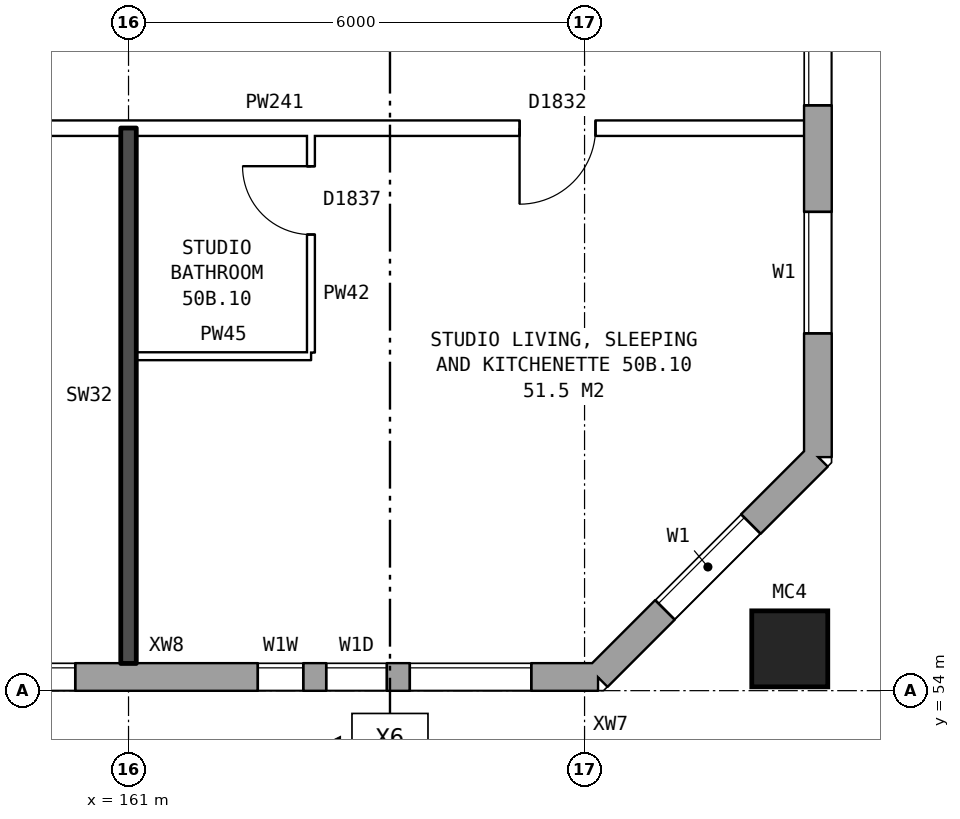
"""IFC4 building model, lengths in metres.
Left out: names, types, materials, properties, quantities, classifications, styles, units other than length and angle.
Written with IfcOpenShell. Run it as: python <this file> out.ifc"""

import sys

from ifc_helpers import new_model, si_unit, direction, frame, frame_2d, origin, origin_2d, place, context, subcontext, project, spatial, rectangle, hollow_rectangle, extrude, element, fill, save


model = new_model("IFC4")
c1 = context("Model", 3, precision=1e-05, world=origin(), true_north=direction((0.0, 1.0)))
c2 = subcontext(c1, "Body", "Model", "MODEL_VIEW")
j1 = project(units=[si_unit("LENGTHUNIT", "METRE"), si_unit("PLANEANGLEUNIT", "RADIAN")], contexts=[c1])
p1 = place(None, origin())
s1 = spatial("IfcSite", under=j1, at=p1, CompositionType="ELEMENT")
p2 = place(p1, origin())
s2 = spatial("IfcBuilding", under=s1, at=p2, CompositionType="ELEMENT")
p3 = place(p2, frame((0.0, 0.0, 178.9)))
s3 = spatial("IfcBuildingStorey", under=s2, at=p3, CompositionType="ELEMENT", Elevation=178.9)
p4 = place(p3, frame((169.7, 54.55, 0.0), z_axis=(0.0, 0.0, 1.0), x_axis=(1.0, 0.0, 0.0)))
e1 = element("IfcColumn", 1, at=p4, inside=s3, PredefinedType="COLUMN", context=c2, shape_type="SweptSolid", body=[
    extrude(hollow_rectangle(XDim=1.0, YDim=1.0, WallThickness=0.055, at=origin_2d()), origin(), (0.0, 0.0, 1.0), 3.1),
])
p5 = place(p3, frame((134.075, 54.18, 0.0), z_axis=(0.0, 0.0, 1.0), x_axis=(1.0, 0.0, 0.0)))
e2 = element("IfcWall", 2, at=p5, inside=s3, PredefinedType="STANDARD", context=c2, shape_type="SweptSolid", body=[
    extrude(rectangle(XDim=33.101, YDim=0.36, at=frame_2d((16.55, 0.0))), origin(), (0.0, 0.0, 1.0), 2.85),
])
p6 = place(p5, frame((0.625, 0.0, 0.8)))
e3 = element("IfcOpeningElement", 3, at=p6, cuts=e2, PredefinedType="OPENING", context=c2, shape_type="SweptSolid", body=[
    extrude(rectangle(XDim=1.6, YDim=1.8, at=frame_2d((0.8, 0.9))), frame((0.0, 0.19, 0.0), z_axis=(0.0, -1.0, 0.0), x_axis=(1.0, 0.0, 0.0)), (0.0, 0.0, 1.0), 0.38),
])
p7 = place(p5, frame((3.125, 0.0, 1.1)))
e4 = element("IfcOpeningElement", 4, at=p7, cuts=e2, PredefinedType="OPENING", context=c2, shape_type="SweptSolid", body=[
    extrude(rectangle(XDim=0.8, YDim=1.5, at=frame_2d((0.4, 0.75))), frame((0.0, 0.19, 0.0), z_axis=(0.0, -1.0, 0.0), x_axis=(1.0, 0.0, 0.0)), (0.0, 0.0, 1.0), 0.38),
])
p8 = place(p5, frame((6.625, 0.0, 0.8)))
e5 = element("IfcOpeningElement", 5, at=p8, cuts=e2, PredefinedType="OPENING", context=c2, shape_type="SweptSolid", body=[
    extrude(rectangle(XDim=1.6, YDim=1.8, at=frame_2d((0.8, 0.9))), frame((0.0, 0.19, 0.0), z_axis=(0.0, -1.0, 0.0), x_axis=(1.0, 0.0, 0.0)), (0.0, 0.0, 1.0), 0.38),
])
p9 = place(p5, frame((9.625, 0.0, 0.8)))
e6 = element("IfcOpeningElement", 6, at=p9, cuts=e2, PredefinedType="OPENING", context=c2, shape_type="SweptSolid", body=[
    extrude(rectangle(XDim=1.6, YDim=1.8, at=frame_2d((0.8, 0.9))), frame((0.0, 0.19, 0.0), z_axis=(0.0, -1.0, 0.0), x_axis=(1.0, 0.0, 0.0)), (0.0, 0.0, 1.0), 0.38),
])
p10 = place(p5, frame((12.625, 0.0, 0.8)))
e7 = element("IfcOpeningElement", 7, at=p10, cuts=e2, PredefinedType="OPENING", context=c2, shape_type="SweptSolid", body=[
    extrude(rectangle(XDim=1.6, YDim=1.8, at=frame_2d((0.8, 0.9))), frame((0.0, 0.19, 0.0), z_axis=(0.0, -1.0, 0.0), x_axis=(1.0, 0.0, 0.0)), (0.0, 0.0, 1.0), 0.38),
])
p11 = place(p5, frame((15.625, 0.0, 0.8)))
e8 = element("IfcOpeningElement", 8, at=p11, cuts=e2, PredefinedType="OPENING", context=c2, shape_type="SweptSolid", body=[
    extrude(rectangle(XDim=1.6, YDim=1.8, at=frame_2d((0.8, 0.9))), frame((0.0, 0.19, 0.0), z_axis=(0.0, -1.0, 0.0), x_axis=(1.0, 0.0, 0.0)), (0.0, 0.0, 1.0), 0.38),
])
p12 = place(p5, frame((18.625, 0.0, 0.8)))
e9 = element("IfcOpeningElement", 9, at=p12, cuts=e2, PredefinedType="OPENING", context=c2, shape_type="SweptSolid", body=[
    extrude(rectangle(XDim=1.6, YDim=1.8, at=frame_2d((0.8, 0.9))), frame((0.0, 0.19, 0.0), z_axis=(0.0, -1.0, 0.0), x_axis=(1.0, 0.0, 0.0)), (0.0, 0.0, 1.0), 0.38),
])
p13 = place(p5, frame((21.625, 0.0, 0.8)))
e10 = element("IfcOpeningElement", 10, at=p13, cuts=e2, PredefinedType="OPENING", context=c2, shape_type="SweptSolid", body=[
    extrude(rectangle(XDim=1.6, YDim=1.8, at=frame_2d((0.8, 0.9))), frame((0.0, 0.19, 0.0), z_axis=(0.0, -1.0, 0.0), x_axis=(1.0, 0.0, 0.0)), (0.0, 0.0, 1.0), 0.38),
])
p14 = place(p5, frame((24.625, 0.0, 0.8)))
e11 = element("IfcOpeningElement", 11, at=p14, cuts=e2, PredefinedType="OPENING", context=c2, shape_type="SweptSolid", body=[
    extrude(rectangle(XDim=1.6, YDim=1.8, at=frame_2d((0.8, 0.9))), frame((0.0, 0.19, 0.0), z_axis=(0.0, -1.0, 0.0), x_axis=(1.0, 0.0, 0.0)), (0.0, 0.0, 1.0), 0.38),
])
p15 = place(p5, frame((28.625, 0.0, 1.7)))
e12 = element("IfcOpeningElement", 12, at=p15, cuts=e2, PredefinedType="OPENING", context=c2, shape_type="SweptSolid", body=[
    extrude(rectangle(XDim=0.6, YDim=0.9, at=frame_2d((0.3, 0.45))), frame((0.0, 0.19, 0.0), z_axis=(0.0, -1.0, 0.0), x_axis=(1.0, 0.0, 0.0)), (0.0, 0.0, 1.0), 0.38),
])
p16 = place(p5, frame((30.625, 0.0, 0.8)))
e13 = element("IfcOpeningElement", 13, at=p16, cuts=e2, PredefinedType="OPENING", context=c2, shape_type="SweptSolid", body=[
    extrude(rectangle(XDim=1.6, YDim=1.8, at=frame_2d((0.8, 0.9))), frame((0.0, 0.19, 0.0), z_axis=(0.0, -1.0, 0.0), x_axis=(1.0, 0.0, 0.0)), (0.0, 0.0, 1.0), 0.38),
])
p17 = place(p5, frame((5.475, 0.0, 0.8)))
e14 = element("IfcOpeningElement", 14, at=p17, cuts=e2, PredefinedType="OPENING", context=c2, shape_type="SweptSolid", body=[
    extrude(rectangle(XDim=0.8, YDim=0.9, at=frame_2d((0.4, 0.45))), frame((0.0, 0.19, 0.0), z_axis=(0.0, -1.0, 0.0), x_axis=(1.0, 0.0, 0.0)), (0.0, 0.0, 1.0), 0.38),
])
p18 = place(p5, frame((29.525, 0.0, 0.8)))
e15 = element("IfcOpeningElement", 15, at=p18, cuts=e2, PredefinedType="OPENING", context=c2, shape_type="SweptSolid", body=[
    extrude(rectangle(XDim=0.8, YDim=1.8, at=frame_2d((0.4, 0.9))), frame((0.0, 0.19, 0.0), z_axis=(0.0, -1.0, 0.0), x_axis=(1.0, 0.0, 0.0)), (0.0, 0.0, 1.0), 0.38),
])
p19 = place(p3, frame((167.175, 54.18, 0.0), z_axis=(0.0, 0.0, 1.0), x_axis=(0.707106781187, 0.707106781187, 0.0)))
e16 = element("IfcWall", 16, at=p19, inside=s3, PredefinedType="STANDARD", context=c2, shape_type="SweptSolid", body=[
    extrude(rectangle(XDim=4.094, YDim=0.36, at=frame_2d((2.047, 0.0))), origin(), (0.0, 0.0, 1.0), 2.85),
])
p20 = place(p19, frame((1.247, 0.0, 0.8)))
e17 = element("IfcOpeningElement", 17, at=p20, cuts=e16, PredefinedType="OPENING", context=c2, shape_type="SweptSolid", body=[
    extrude(rectangle(XDim=1.6, YDim=1.8, at=frame_2d((0.8, 0.9))), frame((0.0, 0.19, 0.0), z_axis=(0.0, -1.0, 0.0), x_axis=(1.0, 0.0, 0.0)), (0.0, 0.0, 1.0), 0.38),
])
p21 = place(p3, frame((170.07, 57.075, 0.0), z_axis=(0.0, 0.0, 1.0), x_axis=(0.0, 1.0, 0.0)))
e18 = element("IfcWall", 18, at=p21, inside=s3, PredefinedType="STANDARD", context=c2, shape_type="SweptSolid", body=[
    extrude(rectangle(XDim=25.851, YDim=0.36, at=frame_2d((12.925, 0.0))), origin(), (0.0, 0.0, 1.0), 2.85),
])
p22 = place(p21, frame((1.625, 0.0, 0.8)))
e19 = element("IfcOpeningElement", 19, at=p22, cuts=e18, PredefinedType="OPENING", context=c2, shape_type="SweptSolid", body=[
    extrude(rectangle(XDim=1.6, YDim=1.8, at=frame_2d((0.8, 0.9))), frame((0.0, 0.19, 0.0), z_axis=(0.0, -1.0, 0.0), x_axis=(1.0, 0.0, 0.0)), (0.0, 0.0, 1.0), 0.38),
])
p23 = place(p21, frame((4.625, 0.0, 0.8)))
e20 = element("IfcOpeningElement", 20, at=p23, cuts=e18, PredefinedType="OPENING", context=c2, shape_type="SweptSolid", body=[
    extrude(rectangle(XDim=1.6, YDim=1.8, at=frame_2d((0.8, 0.9))), frame((0.0, 0.19, 0.0), z_axis=(0.0, -1.0, 0.0), x_axis=(1.0, 0.0, 0.0)), (0.0, 0.0, 1.0), 0.38),
])
p24 = place(p21, frame((6.525, 0.0, 0.8)))
e21 = element("IfcOpeningElement", 21, at=p24, cuts=e18, PredefinedType="OPENING", context=c2, shape_type="SweptSolid", body=[
    extrude(rectangle(XDim=1.4, YDim=1.8, at=frame_2d((0.7, 0.9))), frame((0.0, 0.19, 0.0), z_axis=(0.0, -1.0, 0.0), x_axis=(1.0, 0.0, 0.0)), (0.0, 0.0, 1.0), 0.38),
])
p25 = place(p21, frame((8.225, 0.0, 1.6)))
e22 = element("IfcOpeningElement", 22, at=p25, cuts=e18, PredefinedType="OPENING", context=c2, shape_type="SweptSolid", body=[
    extrude(rectangle(XDim=0.8, YDim=0.9, at=frame_2d((0.4, 0.45))), frame((0.0, 0.19, 0.0), z_axis=(0.0, -1.0, 0.0), x_axis=(1.0, 0.0, 0.0)), (0.0, 0.0, 1.0), 0.38),
])
p26 = place(p21, frame((10.075, 0.0, 0.8)))
e23 = element("IfcOpeningElement", 23, at=p26, cuts=e18, PredefinedType="OPENING", context=c2, shape_type="SweptSolid", body=[
    extrude(rectangle(XDim=1.0, YDim=0.9, at=frame_2d((0.5, 0.45))), frame((0.0, 0.19, 0.0), z_axis=(0.0, -1.0, 0.0), x_axis=(1.0, 0.0, 0.0)), (0.0, 0.0, 1.0), 0.38),
])
p27 = place(p21, frame((11.375, 0.0, 0.8)))
e24 = element("IfcOpeningElement", 24, at=p27, cuts=e18, PredefinedType="OPENING", context=c2, shape_type="SweptSolid", body=[
    extrude(rectangle(XDim=1.2, YDim=1.8, at=frame_2d((0.6, 0.9))), frame((0.0, 0.19, 0.0), z_axis=(0.0, -1.0, 0.0), x_axis=(1.0, 0.0, 0.0)), (0.0, 0.0, 1.0), 0.38),
])
p28 = place(p21, frame((19.625, 0.0, 0.8)))
e25 = element("IfcOpeningElement", 25, at=p28, cuts=e18, PredefinedType="OPENING", context=c2, shape_type="SweptSolid", body=[
    extrude(rectangle(XDim=1.6, YDim=1.8, at=frame_2d((0.8, 0.9))), frame((0.0, 0.19, 0.0), z_axis=(0.0, -1.0, 0.0), x_axis=(1.0, 0.0, 0.0)), (0.0, 0.0, 1.0), 0.38),
])
p29 = place(p21, frame((22.625, 0.0, 0.8)))
e26 = element("IfcOpeningElement", 26, at=p29, cuts=e18, PredefinedType="OPENING", context=c2, shape_type="SweptSolid", body=[
    extrude(rectangle(XDim=1.6, YDim=1.8, at=frame_2d((0.8, 0.9))), frame((0.0, 0.19, 0.0), z_axis=(0.0, -1.0, 0.0), x_axis=(1.0, 0.0, 0.0)), (0.0, 0.0, 1.0), 0.38),
])
p30 = place(p21, frame((12.875, 0.0, 0.8)))
e27 = element("IfcOpeningElement", 27, at=p30, cuts=e18, PredefinedType="OPENING", context=c2, shape_type="SweptSolid", body=[
    extrude(rectangle(XDim=1.6, YDim=1.8, at=frame_2d((0.8, 0.9))), frame((0.0, 0.19, 0.0), z_axis=(0.0, -1.0, 0.0), x_axis=(1.0, 0.0, 0.0)), (0.0, 0.0, 1.0), 0.38),
])
p31 = place(p21, frame((14.775, 0.0, 0.8)))
e28 = element("IfcOpeningElement", 28, at=p31, cuts=e18, PredefinedType="OPENING", context=c2, shape_type="SweptSolid", body=[
    extrude(rectangle(XDim=1.0, YDim=0.9, at=frame_2d((0.5, 0.45))), frame((0.0, 0.19, 0.0), z_axis=(0.0, -1.0, 0.0), x_axis=(1.0, 0.0, 0.0)), (0.0, 0.0, 1.0), 0.38),
])
p32 = place(p21, frame((16.675, 0.0, 1.7)))
e29 = element("IfcOpeningElement", 29, at=p32, cuts=e18, PredefinedType="OPENING", context=c2, shape_type="SweptSolid", body=[
    extrude(rectangle(XDim=0.8, YDim=0.9, at=frame_2d((0.4, 0.45))), frame((0.0, 0.19, 0.0), z_axis=(0.0, -1.0, 0.0), x_axis=(1.0, 0.0, 0.0)), (0.0, 0.0, 1.0), 0.38),
])
p33 = place(p21, frame((17.925, 0.0, 0.8)))
e30 = element("IfcOpeningElement", 30, at=p33, cuts=e18, PredefinedType="OPENING", context=c2, shape_type="SweptSolid", body=[
    extrude(rectangle(XDim=1.4, YDim=1.8, at=frame_2d((0.7, 0.9))), frame((0.0, 0.19, 0.0), z_axis=(0.0, -1.0, 0.0), x_axis=(1.0, 0.0, 0.0)), (0.0, 0.0, 1.0), 0.38),
])
p34 = place(p3, frame((161.1, 58.4, 0.0), z_axis=(0.0, 0.0, 1.0), x_axis=(1.0, 0.0, 0.0)))
e31 = element("IfcWall", 31, at=p34, inside=s3, PredefinedType="PARTITIONING", context=c2, shape_type="SweptSolid", body=[
    extrude(rectangle(XDim=2.3, YDim=0.1, at=frame_2d((1.15, 0.0))), origin(), (0.0, 0.0, 1.0), 2.85),
])
p35 = place(p3, frame((155.1, 61.4, 0.0), z_axis=(0.0, 0.0, 1.0), x_axis=(1.0, 0.0, 0.0)))
e32 = element("IfcWall", 32, at=p35, inside=s3, PredefinedType="PARTITIONING", context=c2, shape_type="SweptSolid", body=[
    extrude(rectangle(XDim=14.79, YDim=0.2, at=frame_2d((7.395, 0.0))), origin(), (0.0, 0.0, 1.0), 2.85),
])
p36 = place(p35, frame((3.6, 0.0, 0.0)))
e33 = element("IfcOpeningElement", 33, at=p36, cuts=e32, PredefinedType="OPENING", context=c2, shape_type="SweptSolid", body=[
    extrude(rectangle(XDim=1.0, YDim=2.1, at=frame_2d((0.5, 1.05))), frame((0.0, 0.11, 0.0), z_axis=(0.0, -1.0, 0.0), x_axis=(1.0, 0.0, 0.0)), (0.0, 0.0, 1.0), 0.22),
])
p37 = place(p35, frame((11.045, 0.0, 0.0)))
e34 = element("IfcOpeningElement", 34, at=p37, cuts=e32, PredefinedType="OPENING", context=c2, shape_type="SweptSolid", body=[
    extrude(rectangle(XDim=1.0, YDim=2.1, at=frame_2d((0.5, 1.05))), frame((0.0, 0.11, 0.0), z_axis=(0.0, -1.0, 0.0), x_axis=(1.0, 0.0, 0.0)), (0.0, 0.0, 1.0), 0.22),
])
p38 = place(p3, frame((161.0, 54.36, 0.0), z_axis=(0.0, 0.0, 1.0), x_axis=(0.0, 1.0, 0.0)))
e35 = element("IfcWall", 35, at=p38, inside=s3, PredefinedType="SOLIDWALL", context=c2, shape_type="SweptSolid", body=[
    extrude(rectangle(XDim=7.04, YDim=0.2, at=frame_2d((3.52, 0.0))), origin(), (0.0, 0.0, 1.0), 2.85),
])
p39 = place(p3, frame((163.4, 58.45, 0.0), z_axis=(0.0, 0.0, 1.0), x_axis=(0.0, 1.0, 0.0)))
e36 = element("IfcWall", 36, at=p39, inside=s3, PredefinedType="PARTITIONING", context=c2, shape_type="SweptSolid", body=[
    extrude(rectangle(XDim=2.85, YDim=0.1, at=frame_2d((1.425, 0.0))), origin(), (0.0, 0.0, 1.0), 2.85),
])
p40 = place(p39, frame((1.55, 0.0, 0.0)))
e37 = element("IfcOpeningElement", 37, at=p40, cuts=e36, PredefinedType="OPENING", context=c2, shape_type="SweptSolid", body=[
    extrude(rectangle(XDim=0.9, YDim=2.1, at=frame_2d((0.45, 1.05))), frame((0.0, 0.06, 0.0), z_axis=(0.0, -1.0, 0.0), x_axis=(1.0, 0.0, 0.0)), (0.0, 0.0, 1.0), 0.12),
])
p41 = place(p14, origin())
e38 = element("IfcWindow", 38, at=p41, inside=s3, PartitioningType="SINGLE_PANEL", PredefinedType="WINDOW", context=c2, shape_type="SweptSolid", body=[
    extrude(rectangle(XDim=1.6, YDim=1.8, at=frame_2d((0.8, 0.9))), frame((0.0, 0.15, 0.0), z_axis=(0.0, -1.0, 0.0), x_axis=(1.0, 0.0, 0.0)), (0.0, 0.0, 1.0), 0.06),
])
fill(e11, e38)
p42 = place(p15, origin())
e39 = element("IfcWindow", 39, at=p42, inside=s3, PartitioningType="SINGLE_PANEL", PredefinedType="WINDOW", context=c2, shape_type="SweptSolid", body=[
    extrude(rectangle(XDim=0.6, YDim=0.9, at=frame_2d((0.3, 0.45))), frame((0.0, 0.15, 0.0), z_axis=(0.0, -1.0, 0.0), x_axis=(1.0, 0.0, 0.0)), (0.0, 0.0, 1.0), 0.06),
])
fill(e12, e39)
p43 = place(p16, origin())
e40 = element("IfcWindow", 40, at=p43, inside=s3, PartitioningType="SINGLE_PANEL", PredefinedType="WINDOW", context=c2, shape_type="SweptSolid", body=[
    extrude(rectangle(XDim=1.6, YDim=1.8, at=frame_2d((0.8, 0.9))), frame((0.0, 0.15, 0.0), z_axis=(0.0, -1.0, 0.0), x_axis=(1.0, 0.0, 0.0)), (0.0, 0.0, 1.0), 0.06),
])
fill(e13, e40)
p44 = place(p20, origin())
e41 = element("IfcWindow", 41, at=p44, inside=s3, PartitioningType="SINGLE_PANEL", PredefinedType="WINDOW", context=c2, shape_type="SweptSolid", body=[
    extrude(rectangle(XDim=1.6, YDim=1.8, at=frame_2d((0.8, 0.9))), frame((0.0, 0.15, 0.0), z_axis=(0.0, -1.0, 0.0), x_axis=(1.0, 0.0, 0.0)), (0.0, 0.0, 1.0), 0.06),
])
fill(e17, e41)
p45 = place(p22, origin())
e42 = element("IfcWindow", 42, at=p45, inside=s3, PartitioningType="SINGLE_PANEL", PredefinedType="WINDOW", context=c2, shape_type="SweptSolid", body=[
    extrude(rectangle(XDim=1.6, YDim=1.8, at=frame_2d((0.8, 0.9))), frame((0.0, 0.15, 0.0), z_axis=(0.0, -1.0, 0.0), x_axis=(1.0, 0.0, 0.0)), (0.0, 0.0, 1.0), 0.06),
])
fill(e19, e42)
p46 = place(p23, origin())
e43 = element("IfcWindow", 43, at=p46, inside=s3, PartitioningType="SINGLE_PANEL", PredefinedType="WINDOW", context=c2, shape_type="SweptSolid", body=[
    extrude(rectangle(XDim=1.6, YDim=1.8, at=frame_2d((0.8, 0.9))), frame((0.0, 0.15, 0.0), z_axis=(0.0, -1.0, 0.0), x_axis=(1.0, 0.0, 0.0)), (0.0, 0.0, 1.0), 0.06),
])
fill(e20, e43)
p47 = place(p37, frame((1.0, 0.0, 0.0), z_axis=(0.0, 0.0, 1.0), x_axis=(-1.0, 0.0, 0.0)))
e44 = element("IfcDoor", 44, at=p47, inside=s3, OperationType="SINGLE_SWING_RIGHT", PredefinedType="DOOR", context=c2, shape_type="SweptSolid", body=[
    extrude(rectangle(XDim=1.0, YDim=2.1, at=frame_2d((0.5, 1.05))), frame((0.0, 0.025, 0.0), z_axis=(0.0, -1.0, 0.0), x_axis=(1.0, 0.0, 0.0)), (0.0, 0.0, 1.0), 0.05),
])
fill(e34, e44)
p48 = place(p40, origin())
e45 = element("IfcDoor", 45, at=p48, inside=s3, OperationType="SINGLE_SWING_RIGHT", PredefinedType="DOOR", context=c2, shape_type="SweptSolid", body=[
    extrude(rectangle(XDim=0.9, YDim=2.1, at=frame_2d((0.45, 1.05))), frame((0.0, 0.025, 0.0), z_axis=(0.0, -1.0, 0.0), x_axis=(1.0, 0.0, 0.0)), (0.0, 0.0, 1.0), 0.05),
])
fill(e37, e45)
p49 = place(p18, origin())
e46 = element("IfcWindow", 46, at=p49, inside=s3, PartitioningType="SINGLE_PANEL", PredefinedType="WINDOW", context=c2, shape_type="SweptSolid", body=[
    extrude(rectangle(XDim=0.8, YDim=1.8, at=frame_2d((0.4, 0.9))), frame((0.0, 0.15, 0.0), z_axis=(0.0, -1.0, 0.0), x_axis=(1.0, 0.0, 0.0)), (0.0, 0.0, 1.0), 0.06),
])
fill(e15, e46)
save(model, sys.argv[1])
